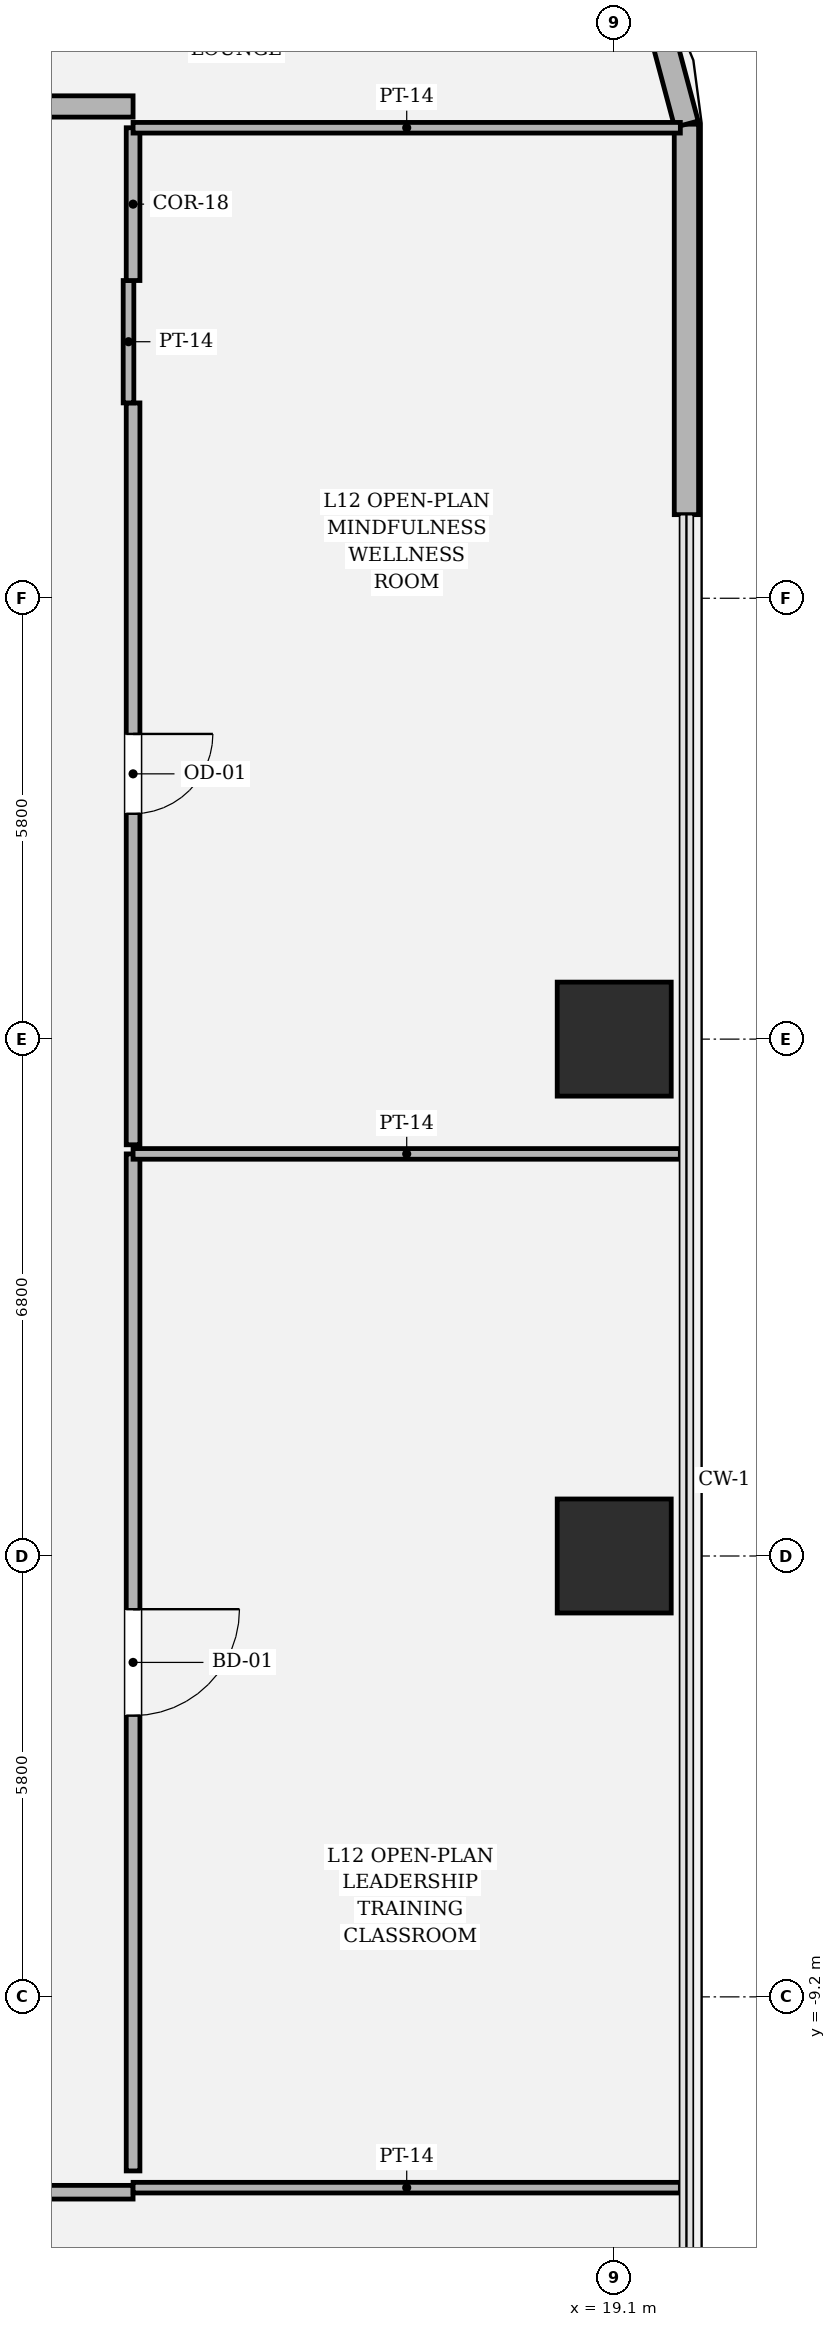
"""IFC4 building model, lengths in metres.
Left out: names, types, materials, properties, quantities, classifications, styles, units other than length and angle.
Written with IfcOpenShell. Run it as: python <this file> out.ifc"""

import sys

from ifc_helpers import new_model, si_unit, direction, frame, frame_2d, origin, origin_2d, place, context, subcontext, project, spatial, rectangle, hollow_rectangle, extrude, element, fill, save


model = new_model("IFC4")
c1 = context("Model", 3, precision=1e-05, world=origin(), true_north=direction((0.0, 1.0)))
c2 = subcontext(c1, "Body", "Model", "MODEL_VIEW")
j1 = project(units=[si_unit("LENGTHUNIT", "METRE"), si_unit("PLANEANGLEUNIT", "RADIAN")], contexts=[c1])
p1 = place(None, origin())
s1 = spatial("IfcSite", under=j1, at=p1, CompositionType="ELEMENT")
p2 = place(p1, origin())
s2 = spatial("IfcBuilding", under=s1, at=p2, CompositionType="ELEMENT")
p3 = place(p2, frame((0.0, 0.0, 56.55)))
s3 = spatial("IfcBuildingStorey", under=s2, at=p3, CompositionType="ELEMENT", Elevation=56.55)
for number, where, z_axis, x_axis in (
    (1, (19.1, -3.4, 0.0), (0.0, 0.0, 1.0), (1.0, 0.0, 0.0)),
    (2, (19.1, 3.4, 0.0), (0.0, 0.0, 1.0), (1.0, 0.0, 0.0)),
):
    element("IfcColumn", number, at=place(p3, frame(where, z_axis=z_axis, x_axis=x_axis)), inside=s3, PredefinedType="COLUMN", context=c2, shape_type="SweptSolid", body=[
        extrude(hollow_rectangle(XDim=1.5, YDim=1.5, WallThickness=0.045, at=origin_2d()), origin(), (0.0, 0.0, 1.0), 4.05),
    ])
p4 = place(p3, frame((20.05, 10.3, 0.0), z_axis=(0.0, 0.0, 1.0), x_axis=(0.0, 1.0, 0.0)))
e3 = element("IfcWall", 3, at=p4, inside=s3, PredefinedType="SOLIDWALL", context=c2, shape_type="SweptSolid", body=[
    extrude(rectangle(XDim=5.137, YDim=0.32, at=frame_2d((2.568, 0.0))), origin(), (0.0, 0.0, 1.0), 3.77),
])
p5 = place(p3, frame((20.05, 15.437, 0.0), z_axis=(0.0, 0.0, 1.0), x_axis=(-0.257847112249, 0.966185730957, 0.0)))
e4 = element("IfcWall", 4, at=p5, inside=s3, PredefinedType="SOLIDWALL", context=c2, shape_type="SweptSolid", body=[
    extrude(rectangle(XDim=1.565, YDim=0.32, at=frame_2d((0.783, 0.0))), origin(), (0.0, 0.0, 1.0), 3.77),
])
p6 = place(p3, frame((1.2, -11.77, 0.0), z_axis=(0.0, 0.0, 1.0), x_axis=(1.0, 0.0, 0.0)))
e5 = element("IfcWall", 5, at=p6, inside=s3, PredefinedType="PARTITIONING", context=c2, shape_type="SweptSolid", body=[
    extrude(rectangle(XDim=11.57, YDim=0.18, at=frame_2d((5.785, 0.0))), origin(), (0.0, 0.0, 1.0), 2.444),
])
p7 = place(p6, frame((5.26, 0.0, 0.0)))
e6 = element("IfcOpeningElement", 6, at=p7, cuts=e5, PredefinedType="OPENING", context=c2, shape_type="SweptSolid", body=[
    extrude(rectangle(XDim=1.05, YDim=2.2, at=frame_2d((0.525, 1.1))), frame((0.0, 0.1, 0.0), z_axis=(0.0, -1.0, 0.0), x_axis=(1.0, 0.0, 0.0)), (0.0, 0.0, 1.0), 0.2),
])
p8 = place(p3, frame((12.77, -11.71, 0.0), z_axis=(0.0, 0.0, 1.0), x_axis=(1.0, 0.0, 0.0)))
e7 = element("IfcWall", 7, at=p8, inside=s3, PredefinedType="PARTITIONING", context=c2, shape_type="SweptSolid", body=[
    extrude(rectangle(XDim=7.2, YDim=0.14, at=frame_2d((3.6, 0.0))), origin(), (0.0, 0.0, 1.0), 2.444),
])
p9 = place(p3, frame((12.77, -11.49, 0.0), z_axis=(0.0, 0.0, 1.0), x_axis=(0.0, 1.0, 0.0)))
e8 = element("IfcWall", 8, at=p9, inside=s3, PredefinedType="PARTITIONING", context=c2, shape_type="SweptSolid", body=[
    extrude(rectangle(XDim=13.38, YDim=0.18, at=frame_2d((6.69, 0.0))), origin(), (0.0, 0.0, 1.0), 2.444),
])
p10 = place(p9, frame((5.99, 0.0, 0.0)))
e9 = element("IfcOpeningElement", 9, at=p10, cuts=e8, PredefinedType="OPENING", context=c2, shape_type="SweptSolid", body=[
    extrude(rectangle(XDim=1.4, YDim=2.25, at=frame_2d((0.7, 1.125))), frame((0.0, 0.1, 0.0), z_axis=(0.0, -1.0, 0.0), x_axis=(1.0, 0.0, 0.0)), (0.0, 0.0, 1.0), 0.2),
])
p11 = place(p3, frame((12.77, 1.89, 0.0), z_axis=(0.0, 0.0, 1.0), x_axis=(1.0, 0.0, 0.0)))
e10 = element("IfcWall", 10, at=p11, inside=s3, PredefinedType="PARTITIONING", context=c2, shape_type="SweptSolid", body=[
    extrude(rectangle(XDim=7.2, YDim=0.14, at=frame_2d((3.6, 0.0))), origin(), (0.0, 0.0, 1.0), 2.444),
])
p12 = place(p3, frame((12.77, 2.01, 0.0), z_axis=(0.0, 0.0, 1.0), x_axis=(0.0, 1.0, 0.0)))
e11 = element("IfcWall", 11, at=p12, inside=s3, PredefinedType="PARTITIONING", context=c2, shape_type="SweptSolid", body=[
    extrude(rectangle(XDim=9.76, YDim=0.18, at=frame_2d((4.88, 0.0))), origin(), (0.0, 0.0, 1.0), 2.444),
])
p13 = place(p12, frame((4.355, 0.0, 0.0)))
e12 = element("IfcOpeningElement", 12, at=p13, cuts=e11, PredefinedType="OPENING", context=c2, shape_type="SweptSolid", body=[
    extrude(rectangle(XDim=1.05, YDim=2.2, at=frame_2d((0.525, 1.1))), frame((0.0, 0.1, 0.0), z_axis=(0.0, -1.0, 0.0), x_axis=(1.0, 0.0, 0.0)), (0.0, 0.0, 1.0), 0.2),
])
p14 = place(p3, frame((12.71, 11.77, 0.0), z_axis=(0.0, 0.0, 1.0), x_axis=(0.0, 1.0, 0.0)))
e13 = element("IfcWall", 13, at=p14, inside=s3, PredefinedType="PARTITIONING", context=c2, shape_type="SweptSolid", body=[
    extrude(rectangle(XDim=1.61, YDim=0.14, at=frame_2d((0.805, 0.0))), origin(), (0.0, 0.0, 1.0), 3.314),
])
p15 = place(p3, frame((12.77, 13.38, 0.0), z_axis=(0.0, 0.0, 1.0), x_axis=(0.0, 1.0, 0.0)))
e14 = element("IfcWall", 14, at=p15, inside=s3, PredefinedType="PARTITIONING", context=c2, shape_type="SweptSolid", body=[
    extrude(rectangle(XDim=2.01, YDim=0.18, at=frame_2d((1.005, 0.0))), origin(), (0.0, 0.0, 1.0), 3.314),
])
p16 = place(p3, frame((12.77, 15.39, 0.0), z_axis=(0.0, 0.0, 1.0), x_axis=(1.0, 0.0, 0.0)))
e15 = element("IfcWall", 15, at=p16, inside=s3, PredefinedType="PARTITIONING", context=c2, shape_type="SweptSolid", body=[
    extrude(rectangle(XDim=7.2, YDim=0.14, at=frame_2d((3.6, 0.0))), origin(), (0.0, 0.0, 1.0), 2.444),
])
p17 = place(p3, frame((12.77, 15.67, 0.0), z_axis=(0.0, 0.0, 1.0), x_axis=(-1.0, 0.0, 0.0)))
e16 = element("IfcWall", 16, at=p17, inside=s3, PredefinedType="SOLIDWALL", context=c2, shape_type="SweptSolid", body=[
    extrude(rectangle(XDim=20.17, YDim=0.28, at=frame_2d((10.085, 0.0))), origin(), (0.0, 0.0, 1.0), 2.444),
])
p18 = place(p10, origin())
e17 = element("IfcDoor", 17, at=p18, inside=s3, OperationType="SINGLE_SWING_RIGHT", PredefinedType="DOOR", context=c2, shape_type="SweptSolid", body=[
    extrude(rectangle(XDim=1.4, YDim=2.25, at=frame_2d((0.7, 1.125))), frame((0.0, 0.025, 0.0), z_axis=(0.0, -1.0, 0.0), x_axis=(1.0, 0.0, 0.0)), (0.0, 0.0, 1.0), 0.05),
])
fill(e9, e17)
p19 = place(p13, origin())
e18 = element("IfcDoor", 18, at=p19, inside=s3, OperationType="SINGLE_SWING_RIGHT", PredefinedType="DOOR", context=c2, shape_type="SweptSolid", body=[
    extrude(rectangle(XDim=1.05, YDim=2.2, at=frame_2d((0.525, 1.1))), frame((0.0, 0.025, 0.0), z_axis=(0.0, -1.0, 0.0), x_axis=(1.0, 0.0, 0.0)), (0.0, 0.0, 1.0), 0.05),
])
fill(e12, e18)
save(model, sys.argv[1])
